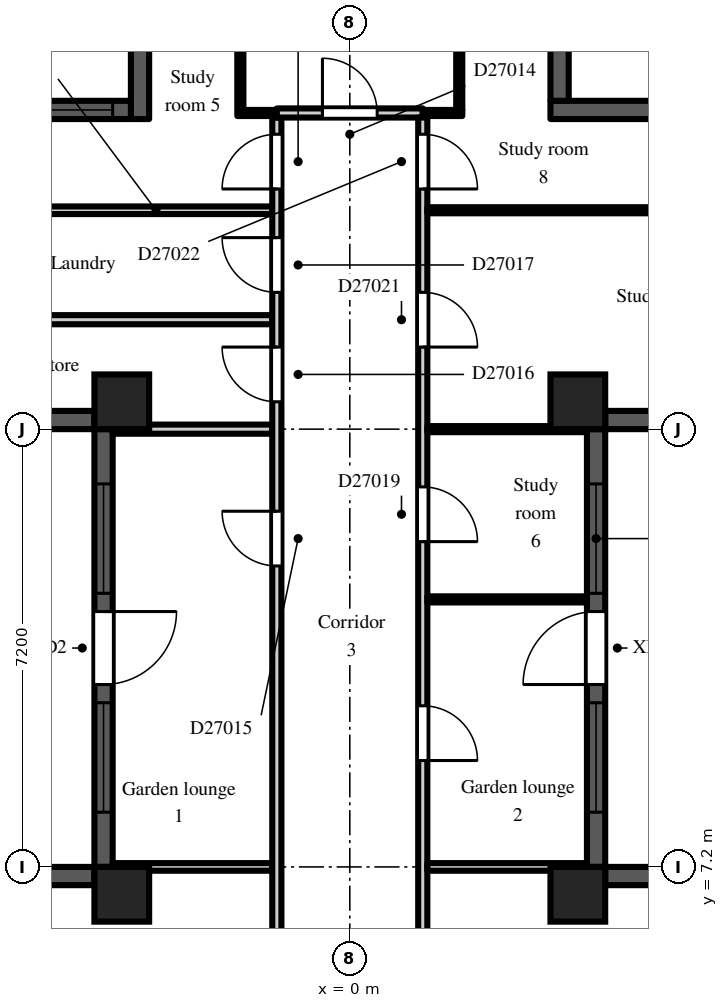
"""IFC4 building model, lengths in metres.
Left out: names, types, materials, properties, quantities, classifications, styles, units other than length and angle.
Written with IfcOpenShell. Run it as: python <this file> out.ifc"""

import sys

from ifc_helpers import new_model, si_unit, direction, frame, frame_2d, origin, origin_2d, place, context, subcontext, project, spatial, rectangle, extrude, element, fill, save


model = new_model("IFC4")
c1 = context("Model", 3, precision=1e-05, world=origin(), true_north=direction((0.0, 1.0)))
c2 = subcontext(c1, "Body", "Model", "MODEL_VIEW")
j1 = project(units=[si_unit("LENGTHUNIT", "METRE"), si_unit("PLANEANGLEUNIT", "RADIAN")], contexts=[c1])
p1 = place(None, origin())
s1 = spatial("IfcSite", under=j1, at=p1, CompositionType="ELEMENT")
p2 = place(p1, origin())
s2 = spatial("IfcBuilding", under=s1, at=p2, CompositionType="ELEMENT")
p3 = place(p2, frame((0.0, 0.0, 191.7)))
s3 = spatial("IfcBuildingStorey", under=s2, at=p3, CompositionType="ELEMENT", Elevation=191.7)
for number, where, z_axis, x_axis in (
    (1, (-3.75, 6.75, 0.0), (0.0, 0.0, 1.0), (1.0, 0.0, 0.0)),
    (2, (-3.75, 14.85, 0.0), (0.0, 0.0, 1.0), (1.0, 0.0, 0.0)),
    (3, (3.75, 6.75, 0.0), (0.0, 0.0, 1.0), (1.0, 0.0, 0.0)),
    (4, (3.75, 14.85, 0.0), (0.0, 0.0, 1.0), (1.0, 0.0, 0.0)),
):
    element("IfcColumn", number, at=place(p3, frame(where, z_axis=z_axis, x_axis=x_axis)), inside=s3, PredefinedType="COLUMN", context=c2, shape_type="SweptSolid", body=[
        extrude(rectangle(XDim=0.9, YDim=0.9, at=origin_2d()), origin(), (0.0, 0.0, 1.0), 3.0),
    ])
p4 = place(p3, frame((7.2, 7.05, 0.0), z_axis=(0.0, 0.0, 1.0), x_axis=(-1.0, 0.0, 0.0)))
e5 = element("IfcWall", 5, at=p4, inside=s3, PredefinedType="SOLIDWALL", context=c2, shape_type="SweptSolid", body=[
    extrude(rectangle(XDim=3.0, YDim=0.3, at=frame_2d((1.5, 0.0))), origin(), (0.0, 0.0, 1.0), 2.55),
])
p5 = place(p3, frame((4.05, 7.2, 0.0), z_axis=(0.0, 0.0, 1.0), x_axis=(0.0, 1.0, 0.0)))
e6 = element("IfcWall", 6, at=p5, inside=s3, PredefinedType="SOLIDWALL", context=c2, shape_type="SweptSolid", body=[
    extrude(rectangle(XDim=7.2, YDim=0.3, at=frame_2d((3.6, 0.0))), origin(), (0.0, 0.0, 1.0), 2.55),
])
p6 = place(p5, frame((3.0, 0.0, 0.0)))
e7 = element("IfcOpeningElement", 7, at=p6, cuts=e6, PredefinedType="OPENING", context=c2, shape_type="SweptSolid", body=[
    extrude(rectangle(XDim=1.2, YDim=2.05, at=frame_2d((0.6, 1.025))), frame((0.0, 0.16, 0.0), z_axis=(0.0, -1.0, 0.0), x_axis=(1.0, 0.0, 0.0)), (0.0, 0.0, 1.0), 0.32),
])
p7 = place(p5, frame((0.9, 0.0, 0.2)))
e8 = element("IfcOpeningElement", 8, at=p7, cuts=e6, PredefinedType="OPENING", context=c2, shape_type="SweptSolid", body=[
    extrude(rectangle(XDim=1.8, YDim=1.85, at=frame_2d((0.9, 0.925))), frame((0.0, 0.16, 0.0), z_axis=(0.0, -1.0, 0.0), x_axis=(1.0, 0.0, 0.0)), (0.0, 0.0, 1.0), 0.32),
])
p8 = place(p5, frame((4.5, 0.0, 0.2)))
e9 = element("IfcOpeningElement", 9, at=p8, cuts=e6, PredefinedType="OPENING", context=c2, shape_type="SweptSolid", body=[
    extrude(rectangle(XDim=1.8, YDim=1.85, at=frame_2d((0.9, 0.925))), frame((0.0, 0.16, 0.0), z_axis=(0.0, -1.0, 0.0), x_axis=(1.0, 0.0, 0.0)), (0.0, 0.0, 1.0), 0.32),
])
p9 = place(p3, frame((4.2, 14.55, 0.0), z_axis=(0.0, 0.0, 1.0), x_axis=(1.0, 0.0, 0.0)))
e10 = element("IfcWall", 10, at=p9, inside=s3, PredefinedType="SOLIDWALL", context=c2, shape_type="SweptSolid", body=[
    extrude(rectangle(XDim=2.1, YDim=0.3, at=frame_2d((1.05, 0.0))), origin(), (0.0, 0.0, 1.0), 2.55),
])
p10 = place(p3, frame((5.1, 19.65, 0.0), z_axis=(0.0, 0.0, 1.0), x_axis=(-1.0, 0.0, 0.0)))
e11 = element("IfcWall", 11, at=p10, inside=s3, PredefinedType="SOLIDWALL", context=c2, shape_type="SweptSolid", body=[
    extrude(rectangle(XDim=1.8, YDim=0.3, at=frame_2d((0.9, 0.0))), origin(), (0.0, 0.0, 1.0), 2.55),
])
p11 = place(p3, frame((3.45, 19.8, 0.0), z_axis=(0.0, 0.0, 1.0), x_axis=(0.0, 1.0, 0.0)))
e12 = element("IfcWall", 12, at=p11, inside=s3, PredefinedType="SOLIDWALL", context=c2, shape_type="SweptSolid", body=[
    extrude(rectangle(XDim=0.9, YDim=0.3, at=frame_2d((0.45, 0.0))), origin(), (0.0, 0.0, 1.0), 2.55),
])
p12 = place(p3, frame((-3.45, 20.7, 0.0), z_axis=(0.0, 0.0, 1.0), x_axis=(0.0, -1.0, 0.0)))
e13 = element("IfcWall", 13, at=p12, inside=s3, PredefinedType="SOLIDWALL", context=c2, shape_type="SweptSolid", body=[
    extrude(rectangle(XDim=1.2, YDim=0.3, at=frame_2d((0.6, 0.0))), origin(), (0.0, 0.0, 1.0), 2.55),
])
p13 = place(p3, frame((-3.6, 19.65, 0.0), z_axis=(0.0, 0.0, 1.0), x_axis=(-1.0, 0.0, 0.0)))
e14 = element("IfcWall", 14, at=p13, inside=s3, PredefinedType="SOLIDWALL", context=c2, shape_type="SweptSolid", body=[
    extrude(rectangle(XDim=1.8, YDim=0.3, at=frame_2d((0.9, 0.0))), origin(), (0.0, 0.0, 1.0), 2.55),
])
p14 = place(p13, frame((0.3, 0.0, 0.2)))
e15 = element("IfcOpeningElement", 15, at=p14, cuts=e14, PredefinedType="OPENING", context=c2, shape_type="SweptSolid", body=[
    extrude(rectangle(XDim=1.2, YDim=1.85, at=frame_2d((0.6, 0.925))), frame((0.0, 0.16, 0.0), z_axis=(0.0, -1.0, 0.0), x_axis=(1.0, 0.0, 0.0)), (0.0, 0.0, 1.0), 0.32),
])
p15 = place(p3, frame((-6.3, 14.55, 0.0), z_axis=(0.0, 0.0, 1.0), x_axis=(1.0, 0.0, 0.0)))
e16 = element("IfcWall", 16, at=p15, inside=s3, PredefinedType="SOLIDWALL", context=c2, shape_type="SweptSolid", body=[
    extrude(rectangle(XDim=2.1, YDim=0.3, at=frame_2d((1.05, 0.0))), origin(), (0.0, 0.0, 1.0), 2.55),
])
p16 = place(p3, frame((-4.05, 14.4, 0.0), z_axis=(0.0, 0.0, 1.0), x_axis=(0.0, -1.0, 0.0)))
e17 = element("IfcWall", 17, at=p16, inside=s3, PredefinedType="SOLIDWALL", context=c2, shape_type="SweptSolid", body=[
    extrude(rectangle(XDim=7.2, YDim=0.3, at=frame_2d((3.6, 0.0))), origin(), (0.0, 0.0, 1.0), 2.55),
])
p17 = place(p16, frame((3.0, 0.0, 0.0)))
e18 = element("IfcOpeningElement", 18, at=p17, cuts=e17, PredefinedType="OPENING", context=c2, shape_type="SweptSolid", body=[
    extrude(rectangle(XDim=1.2, YDim=2.05, at=frame_2d((0.6, 1.025))), frame((0.0, 0.16, 0.0), z_axis=(0.0, -1.0, 0.0), x_axis=(1.0, 0.0, 0.0)), (0.0, 0.0, 1.0), 0.32),
])
p18 = place(p16, frame((0.9, 0.0, 0.2)))
e19 = element("IfcOpeningElement", 19, at=p18, cuts=e17, PredefinedType="OPENING", context=c2, shape_type="SweptSolid", body=[
    extrude(rectangle(XDim=1.8, YDim=1.85, at=frame_2d((0.9, 0.925))), frame((0.0, 0.16, 0.0), z_axis=(0.0, -1.0, 0.0), x_axis=(1.0, 0.0, 0.0)), (0.0, 0.0, 1.0), 0.32),
])
p19 = place(p16, frame((4.5, 0.0, 0.2)))
e20 = element("IfcOpeningElement", 20, at=p19, cuts=e17, PredefinedType="OPENING", context=c2, shape_type="SweptSolid", body=[
    extrude(rectangle(XDim=1.8, YDim=1.85, at=frame_2d((0.9, 0.925))), frame((0.0, 0.16, 0.0), z_axis=(0.0, -1.0, 0.0), x_axis=(1.0, 0.0, 0.0)), (0.0, 0.0, 1.0), 0.32),
])
p20 = place(p3, frame((-4.2, 7.05, 0.0), z_axis=(0.0, 0.0, 1.0), x_axis=(-1.0, 0.0, 0.0)))
e21 = element("IfcWall", 21, at=p20, inside=s3, PredefinedType="SOLIDWALL", context=c2, shape_type="SweptSolid", body=[
    extrude(rectangle(XDim=3.0, YDim=0.3, at=frame_2d((1.5, 0.0))), origin(), (0.0, 0.0, 1.0), 2.55),
])
p21 = place(p3, frame((-6.9, 16.2, 0.0), z_axis=(0.0, 0.0, 1.0), x_axis=(1.0, 0.0, 0.0)))
e22 = element("IfcWall", 22, at=p21, inside=s3, PredefinedType="PARTITIONING", context=c2, shape_type="SweptSolid", body=[
    extrude(rectangle(XDim=5.625, YDim=0.15, at=frame_2d((2.812, 0.0))), origin(), (0.0, 0.0, 1.0), 2.55),
])
p22 = place(p3, frame((-5.1, 18.0, 0.0), z_axis=(0.0, 0.0, 1.0), x_axis=(1.0, 0.0, 0.0)))
e23 = element("IfcWall", 23, at=p22, inside=s3, PredefinedType="PARTITIONING", context=c2, shape_type="SweptSolid", body=[
    extrude(rectangle(XDim=3.825, YDim=0.125, at=frame_2d((1.913, 0.0))), origin(), (0.0, 0.0, 1.0), 2.55),
])
p23 = place(p3, frame((-3.9, 7.2, 0.0), z_axis=(0.0, 0.0, 1.0), x_axis=(1.0, 0.0, 0.0)))
e24 = element("IfcWall", 24, at=p23, inside=s3, PredefinedType="PARTITIONING", context=c2, shape_type="SweptSolid", body=[
    extrude(rectangle(XDim=2.625, YDim=0.125, at=frame_2d((1.312, 0.0))), origin(), (0.0, 0.0, 1.0), 2.55),
])
p24 = place(p3, frame((-3.9, 14.4, 0.0), z_axis=(0.0, 0.0, 1.0), x_axis=(1.0, 0.0, 0.0)))
e25 = element("IfcWall", 25, at=p24, inside=s3, PredefinedType="PARTITIONING", context=c2, shape_type="SweptSolid", body=[
    extrude(rectangle(XDim=2.625, YDim=0.15, at=frame_2d((1.312, 0.0))), origin(), (0.0, 0.0, 1.0), 2.55),
])
p25 = place(p3, frame((-1.8, 19.55, 0.0), z_axis=(0.0, 0.0, 1.0), x_axis=(0.0, 1.0, 0.0)))
e26 = element("IfcWall", 26, at=p25, inside=s3, PredefinedType="PARTITIONING", context=c2, shape_type="SweptSolid", body=[
    extrude(rectangle(XDim=1.75, YDim=0.1, at=frame_2d((0.875, 0.0))), origin(), (0.0, 0.0, 1.0), 2.55),
])
p26 = place(p3, frame((-1.75, 19.6, 0.0), z_axis=(0.0, 0.0, 1.0), x_axis=(1.0, 0.0, 0.0)))
e27 = element("IfcWall", 27, at=p26, inside=s3, PredefinedType="PARTITIONING", context=c2, shape_type="SweptSolid", body=[
    extrude(rectangle(XDim=0.55, YDim=0.1, at=frame_2d((0.275, 0.0))), origin(), (0.0, 0.0, 1.0), 2.55),
])
p27 = place(p3, frame((-1.2, 1.275, 0.0), z_axis=(0.0, 0.0, 1.0), x_axis=(0.0, 1.0, 0.0)))
e28 = element("IfcWall", 28, at=p27, inside=s3, PredefinedType="PARTITIONING", context=c2, shape_type="SweptSolid", body=[
    extrude(rectangle(XDim=18.25, YDim=0.15, at=frame_2d((9.125, 0.0))), origin(), (0.0, 0.0, 1.0), 2.55),
])
p28 = place(p27, frame((2.475, 0.0, 0.0)))
e29 = element("IfcOpeningElement", 29, at=p28, cuts=e28, PredefinedType="OPENING", context=c2, shape_type="SweptSolid", body=[
    extrude(rectangle(XDim=0.9, YDim=2.1, at=frame_2d((0.45, 1.05))), frame((0.0, 0.085, 0.0), z_axis=(0.0, -1.0, 0.0), x_axis=(1.0, 0.0, 0.0)), (0.0, 0.0, 1.0), 0.17),
])
p29 = place(p27, frame((10.875, 0.0, 0.0)))
e30 = element("IfcOpeningElement", 30, at=p29, cuts=e28, PredefinedType="OPENING", context=c2, shape_type="SweptSolid", body=[
    extrude(rectangle(XDim=0.9, YDim=2.1, at=frame_2d((0.45, 1.05))), frame((0.0, 0.085, 0.0), z_axis=(0.0, -1.0, 0.0), x_axis=(1.0, 0.0, 0.0)), (0.0, 0.0, 1.0), 0.17),
])
p30 = place(p27, frame((13.575, 0.0, 0.0)))
e31 = element("IfcOpeningElement", 31, at=p30, cuts=e28, PredefinedType="OPENING", context=c2, shape_type="SweptSolid", body=[
    extrude(rectangle(XDim=0.9, YDim=2.1, at=frame_2d((0.45, 1.05))), frame((0.0, 0.085, 0.0), z_axis=(0.0, -1.0, 0.0), x_axis=(1.0, 0.0, 0.0)), (0.0, 0.0, 1.0), 0.17),
])
p31 = place(p27, frame((15.375, 0.0, 0.0)))
e32 = element("IfcOpeningElement", 32, at=p31, cuts=e28, PredefinedType="OPENING", context=c2, shape_type="SweptSolid", body=[
    extrude(rectangle(XDim=0.9, YDim=2.1, at=frame_2d((0.45, 1.05))), frame((0.0, 0.085, 0.0), z_axis=(0.0, -1.0, 0.0), x_axis=(1.0, 0.0, 0.0)), (0.0, 0.0, 1.0), 0.17),
])
p32 = place(p27, frame((17.075, 0.0, 0.0)))
e33 = element("IfcOpeningElement", 33, at=p32, cuts=e28, PredefinedType="OPENING", context=c2, shape_type="SweptSolid", body=[
    extrude(rectangle(XDim=0.9, YDim=2.1, at=frame_2d((0.45, 1.05))), frame((0.0, 0.085, 0.0), z_axis=(0.0, -1.0, 0.0), x_axis=(1.0, 0.0, 0.0)), (0.0, 0.0, 1.0), 0.17),
])
p33 = place(p3, frame((-1.2, 19.6, 0.0), z_axis=(0.0, 0.0, 1.0), x_axis=(1.0, 0.0, 0.0)))
e34 = element("IfcWall", 34, at=p33, inside=s3, PredefinedType="PARTITIONING", context=c2, shape_type="SweptSolid", body=[
    extrude(rectangle(XDim=2.4, YDim=0.15, at=frame_2d((1.2, 0.0))), origin(), (0.0, 0.0, 1.0), 2.55),
])
p34 = place(p33, frame((0.75, 0.0, 0.0)))
e35 = element("IfcOpeningElement", 35, at=p34, cuts=e34, PredefinedType="OPENING", context=c2, shape_type="SweptSolid", body=[
    extrude(rectangle(XDim=0.9, YDim=2.1, at=frame_2d((0.45, 1.05))), frame((0.0, 0.085, 0.0), z_axis=(0.0, -1.0, 0.0), x_axis=(1.0, 0.0, 0.0)), (0.0, 0.0, 1.0), 0.17),
])
p35 = place(p3, frame((1.2, 1.125, 0.0), z_axis=(0.0, 0.0, 1.0), x_axis=(0.0, 1.0, 0.0)))
e36 = element("IfcWall", 36, at=p35, inside=s3, PredefinedType="PARTITIONING", context=c2, shape_type="SweptSolid", body=[
    extrude(rectangle(XDim=18.4, YDim=0.15, at=frame_2d((9.2, 0.0))), origin(), (0.0, 0.0, 1.0), 2.55),
])
p36 = place(p35, frame((3.825, 0.0, 0.0)))
e37 = element("IfcOpeningElement", 37, at=p36, cuts=e36, PredefinedType="OPENING", context=c2, shape_type="SweptSolid", body=[
    extrude(rectangle(XDim=0.9, YDim=2.1, at=frame_2d((0.45, 1.05))), frame((0.0, 0.085, 0.0), z_axis=(0.0, -1.0, 0.0), x_axis=(1.0, 0.0, 0.0)), (0.0, 0.0, 1.0), 0.17),
])
p37 = place(p35, frame((11.425, 0.0, 0.0)))
e38 = element("IfcOpeningElement", 38, at=p37, cuts=e36, PredefinedType="OPENING", context=c2, shape_type="SweptSolid", body=[
    extrude(rectangle(XDim=0.9, YDim=2.1, at=frame_2d((0.45, 1.05))), frame((0.0, 0.085, 0.0), z_axis=(0.0, -1.0, 0.0), x_axis=(1.0, 0.0, 0.0)), (0.0, 0.0, 1.0), 0.17),
])
p38 = place(p35, frame((7.825, 0.0, 0.0)))
e39 = element("IfcOpeningElement", 39, at=p38, cuts=e36, PredefinedType="OPENING", context=c2, shape_type="SweptSolid", body=[
    extrude(rectangle(XDim=0.9, YDim=2.1, at=frame_2d((0.45, 1.05))), frame((0.0, 0.085, 0.0), z_axis=(0.0, -1.0, 0.0), x_axis=(1.0, 0.0, 0.0)), (0.0, 0.0, 1.0), 0.17),
])
p39 = place(p35, frame((14.625, 0.0, 0.0)))
e40 = element("IfcOpeningElement", 40, at=p39, cuts=e36, PredefinedType="OPENING", context=c2, shape_type="SweptSolid", body=[
    extrude(rectangle(XDim=0.9, YDim=2.1, at=frame_2d((0.45, 1.05))), frame((0.0, 0.085, 0.0), z_axis=(0.0, -1.0, 0.0), x_axis=(1.0, 0.0, 0.0)), (0.0, 0.0, 1.0), 0.17),
])
p40 = place(p35, frame((17.225, 0.0, 0.0)))
e41 = element("IfcOpeningElement", 41, at=p40, cuts=e36, PredefinedType="OPENING", context=c2, shape_type="SweptSolid", body=[
    extrude(rectangle(XDim=0.9, YDim=2.1, at=frame_2d((0.45, 1.05))), frame((0.0, 0.085, 0.0), z_axis=(0.0, -1.0, 0.0), x_axis=(1.0, 0.0, 0.0)), (0.0, 0.0, 1.0), 0.17),
])
p41 = place(p3, frame((1.275, 7.2, 0.0), z_axis=(0.0, 0.0, 1.0), x_axis=(1.0, 0.0, 0.0)))
e42 = element("IfcWall", 42, at=p41, inside=s3, PredefinedType="PARTITIONING", context=c2, shape_type="SweptSolid", body=[
    extrude(rectangle(XDim=2.625, YDim=0.125, at=frame_2d((1.312, 0.0))), origin(), (0.0, 0.0, 1.0), 2.55),
])
for number, where, z_axis, x_axis in (
    (43, (1.275, 11.6, 0.0), (0.0, 0.0, 1.0), (1.0, 0.0, 0.0)),
    (44, (1.275, 14.4, 0.0), (0.0, 0.0, 1.0), (1.0, 0.0, 0.0)),
):
    element("IfcWall", number, at=place(p3, frame(where, z_axis=z_axis, x_axis=x_axis)), inside=s3, PredefinedType="PARTITIONING", context=c2, shape_type="SweptSolid", body=[
        extrude(rectangle(XDim=2.625, YDim=0.1, at=frame_2d((1.312, 0.0))), origin(), (0.0, 0.0, 1.0), 2.55),
    ])
p42 = place(p3, frame((1.275, 18.0, 0.0), z_axis=(0.0, 0.0, 1.0), x_axis=(1.0, 0.0, 0.0)))
e45 = element("IfcWall", 45, at=p42, inside=s3, PredefinedType="PARTITIONING", context=c2, shape_type="SweptSolid", body=[
    extrude(rectangle(XDim=3.825, YDim=0.1, at=frame_2d((1.913, 0.0))), origin(), (0.0, 0.0, 1.0), 2.55),
])
p43 = place(p3, frame((1.2, 19.6, 0.0), z_axis=(0.0, 0.0, 1.0), x_axis=(1.0, 0.0, 0.0)))
e46 = element("IfcWall", 46, at=p43, inside=s3, PredefinedType="PARTITIONING", context=c2, shape_type="SweptSolid", body=[
    extrude(rectangle(XDim=0.65, YDim=0.1, at=frame_2d((0.325, 0.0))), origin(), (0.0, 0.0, 1.0), 2.55),
])
p44 = place(p3, frame((1.8, 19.65, 0.0), z_axis=(0.0, 0.0, 1.0), x_axis=(0.0, 1.0, 0.0)))
e47 = element("IfcWall", 47, at=p44, inside=s3, PredefinedType="PARTITIONING", context=c2, shape_type="SweptSolid", body=[
    extrude(rectangle(XDim=1.65, YDim=0.1, at=frame_2d((0.825, 0.0))), origin(), (0.0, 0.0, 1.0), 2.55),
])
p45 = place(p6, origin())
e48 = element("IfcDoor", 48, at=p45, inside=s3, OperationType="SINGLE_SWING_LEFT", PredefinedType="DOOR", context=c2, shape_type="SweptSolid", body=[
    extrude(rectangle(XDim=1.2, YDim=2.05, at=frame_2d((0.6, 1.025))), frame((0.0, 0.025, 0.0), z_axis=(0.0, -1.0, 0.0), x_axis=(1.0, 0.0, 0.0)), (0.0, 0.0, 1.0), 0.05),
])
fill(e7, e48)
p46 = place(p7, origin())
e49 = element("IfcWindow", 49, at=p46, inside=s3, PartitioningType="SINGLE_PANEL", PredefinedType="WINDOW", context=c2, shape_type="SweptSolid", body=[
    extrude(rectangle(XDim=1.8, YDim=1.85, at=frame_2d((0.9, 0.925))), frame((0.0, 0.03, 0.0), z_axis=(0.0, -1.0, 0.0), x_axis=(1.0, 0.0, 0.0)), (0.0, 0.0, 1.0), 0.06),
])
fill(e8, e49)
p47 = place(p8, origin())
e50 = element("IfcWindow", 50, at=p47, inside=s3, PartitioningType="SINGLE_PANEL", PredefinedType="WINDOW", context=c2, shape_type="SweptSolid", body=[
    extrude(rectangle(XDim=1.8, YDim=1.85, at=frame_2d((0.9, 0.925))), frame((0.0, 0.03, 0.0), z_axis=(0.0, -1.0, 0.0), x_axis=(1.0, 0.0, 0.0)), (0.0, 0.0, 1.0), 0.06),
])
fill(e9, e50)
p48 = place(p14, origin())
e51 = element("IfcWindow", 51, at=p48, inside=s3, PartitioningType="SINGLE_PANEL", PredefinedType="WINDOW", context=c2, shape_type="SweptSolid", body=[
    extrude(rectangle(XDim=1.2, YDim=1.85, at=frame_2d((0.6, 0.925))), frame((0.0, 0.03, 0.0), z_axis=(0.0, -1.0, 0.0), x_axis=(1.0, 0.0, 0.0)), (0.0, 0.0, 1.0), 0.06),
])
fill(e15, e51)
p49 = place(p17, origin())
e52 = element("IfcDoor", 52, at=p49, inside=s3, OperationType="SINGLE_SWING_LEFT", PredefinedType="DOOR", context=c2, shape_type="SweptSolid", body=[
    extrude(rectangle(XDim=1.2, YDim=2.05, at=frame_2d((0.6, 1.025))), frame((0.0, 0.025, 0.0), z_axis=(0.0, -1.0, 0.0), x_axis=(1.0, 0.0, 0.0)), (0.0, 0.0, 1.0), 0.05),
])
fill(e18, e52)
p50 = place(p18, origin())
e53 = element("IfcWindow", 53, at=p50, inside=s3, PartitioningType="SINGLE_PANEL", PredefinedType="WINDOW", context=c2, shape_type="SweptSolid", body=[
    extrude(rectangle(XDim=1.8, YDim=1.85, at=frame_2d((0.9, 0.925))), frame((0.0, 0.03, 0.0), z_axis=(0.0, -1.0, 0.0), x_axis=(1.0, 0.0, 0.0)), (0.0, 0.0, 1.0), 0.06),
])
fill(e19, e53)
p51 = place(p19, origin())
e54 = element("IfcWindow", 54, at=p51, inside=s3, PartitioningType="SINGLE_PANEL", PredefinedType="WINDOW", context=c2, shape_type="SweptSolid", body=[
    extrude(rectangle(XDim=1.8, YDim=1.85, at=frame_2d((0.9, 0.925))), frame((0.0, 0.03, 0.0), z_axis=(0.0, -1.0, 0.0), x_axis=(1.0, 0.0, 0.0)), (0.0, 0.0, 1.0), 0.06),
])
fill(e20, e54)
p52 = place(p34, origin())
e55 = element("IfcDoor", 55, at=p52, inside=s3, OperationType="SINGLE_SWING_LEFT", PredefinedType="DOOR", context=c2, shape_type="SweptSolid", body=[
    extrude(rectangle(XDim=0.9, YDim=2.1, at=frame_2d((0.45, 1.05))), frame((0.0, 0.025, 0.0), z_axis=(0.0, -1.0, 0.0), x_axis=(1.0, 0.0, 0.0)), (0.0, 0.0, 1.0), 0.05),
])
fill(e35, e55)
p53 = place(p29, origin())
e56 = element("IfcDoor", 56, at=p53, inside=s3, OperationType="SINGLE_SWING_RIGHT", PredefinedType="DOOR", context=c2, shape_type="SweptSolid", body=[
    extrude(rectangle(XDim=0.9, YDim=2.1, at=frame_2d((0.45, 1.05))), frame((0.0, 0.025, 0.0), z_axis=(0.0, -1.0, 0.0), x_axis=(1.0, 0.0, 0.0)), (0.0, 0.0, 1.0), 0.05),
])
fill(e30, e56)
p54 = place(p30, origin())
e57 = element("IfcDoor", 57, at=p54, inside=s3, OperationType="SINGLE_SWING_RIGHT", PredefinedType="DOOR", context=c2, shape_type="SweptSolid", body=[
    extrude(rectangle(XDim=0.9, YDim=2.1, at=frame_2d((0.45, 1.05))), frame((0.0, 0.025, 0.0), z_axis=(0.0, -1.0, 0.0), x_axis=(1.0, 0.0, 0.0)), (0.0, 0.0, 1.0), 0.05),
])
fill(e31, e57)
p55 = place(p31, origin())
e58 = element("IfcDoor", 58, at=p55, inside=s3, OperationType="SINGLE_SWING_RIGHT", PredefinedType="DOOR", context=c2, shape_type="SweptSolid", body=[
    extrude(rectangle(XDim=0.9, YDim=2.1, at=frame_2d((0.45, 1.05))), frame((0.0, 0.025, 0.0), z_axis=(0.0, -1.0, 0.0), x_axis=(1.0, 0.0, 0.0)), (0.0, 0.0, 1.0), 0.05),
])
fill(e32, e58)
p56 = place(p32, origin())
e59 = element("IfcDoor", 59, at=p56, inside=s3, OperationType="SINGLE_SWING_LEFT", PredefinedType="DOOR", context=c2, shape_type="SweptSolid", body=[
    extrude(rectangle(XDim=0.9, YDim=2.1, at=frame_2d((0.45, 1.05))), frame((0.0, 0.025, 0.0), z_axis=(0.0, -1.0, 0.0), x_axis=(1.0, 0.0, 0.0)), (0.0, 0.0, 1.0), 0.05),
])
fill(e33, e59)
p57 = place(p37, frame((0.9, 0.0, 0.0), z_axis=(0.0, 0.0, 1.0), x_axis=(-1.0, 0.0, 0.0)))
e60 = element("IfcDoor", 60, at=p57, inside=s3, OperationType="SINGLE_SWING_RIGHT", PredefinedType="DOOR", context=c2, shape_type="SweptSolid", body=[
    extrude(rectangle(XDim=0.9, YDim=2.1, at=frame_2d((0.45, 1.05))), frame((0.0, 0.025, 0.0), z_axis=(0.0, -1.0, 0.0), x_axis=(1.0, 0.0, 0.0)), (0.0, 0.0, 1.0), 0.05),
])
fill(e38, e60)
p58 = place(p38, frame((0.9, 0.0, 0.0), z_axis=(0.0, 0.0, 1.0), x_axis=(-1.0, 0.0, 0.0)))
e61 = element("IfcDoor", 61, at=p58, inside=s3, OperationType="SINGLE_SWING_RIGHT", PredefinedType="DOOR", context=c2, shape_type="SweptSolid", body=[
    extrude(rectangle(XDim=0.9, YDim=2.1, at=frame_2d((0.45, 1.05))), frame((0.0, 0.025, 0.0), z_axis=(0.0, -1.0, 0.0), x_axis=(1.0, 0.0, 0.0)), (0.0, 0.0, 1.0), 0.05),
])
fill(e39, e61)
p59 = place(p39, frame((0.9, 0.0, 0.0), z_axis=(0.0, 0.0, 1.0), x_axis=(-1.0, 0.0, 0.0)))
e62 = element("IfcDoor", 62, at=p59, inside=s3, OperationType="SINGLE_SWING_RIGHT", PredefinedType="DOOR", context=c2, shape_type="SweptSolid", body=[
    extrude(rectangle(XDim=0.9, YDim=2.1, at=frame_2d((0.45, 1.05))), frame((0.0, 0.025, 0.0), z_axis=(0.0, -1.0, 0.0), x_axis=(1.0, 0.0, 0.0)), (0.0, 0.0, 1.0), 0.05),
])
fill(e40, e62)
p60 = place(p40, frame((0.9, 0.0, 0.0), z_axis=(0.0, 0.0, 1.0), x_axis=(-1.0, 0.0, 0.0)))
e63 = element("IfcDoor", 63, at=p60, inside=s3, OperationType="SINGLE_SWING_RIGHT", PredefinedType="DOOR", context=c2, shape_type="SweptSolid", body=[
    extrude(rectangle(XDim=0.9, YDim=2.1, at=frame_2d((0.45, 1.05))), frame((0.0, 0.025, 0.0), z_axis=(0.0, -1.0, 0.0), x_axis=(1.0, 0.0, 0.0)), (0.0, 0.0, 1.0), 0.05),
])
fill(e41, e63)
save(model, sys.argv[1])
